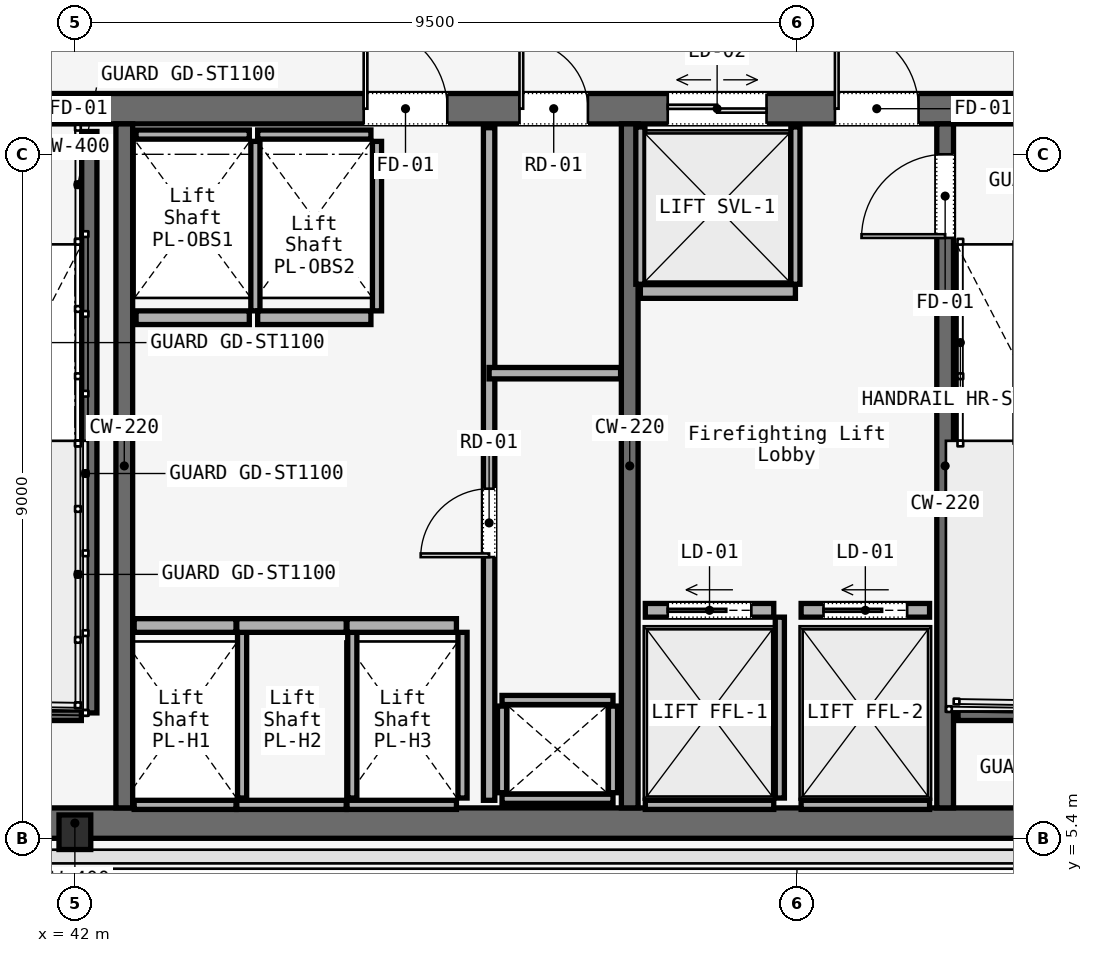
"""IFC4 building model, lengths in metres.
Left out: names, types, materials, properties, quantities, classifications, styles, units other than length and angle.
Written with IfcOpenShell. Run it as: python <this file> out.ifc"""

import sys

from ifc_helpers import new_model, si_unit, direction, frame, frame_2d, origin, origin_2d, place, context, subcontext, project, spatial, rectangle, i_section, extrude, element, fill, save


model = new_model("IFC4")
c1 = context("Model", 3, precision=1e-05, world=origin(), true_north=direction((0.0, 1.0)))
c2 = subcontext(c1, "Body", "Model", "MODEL_VIEW")
j1 = project(units=[si_unit("LENGTHUNIT", "METRE"), si_unit("PLANEANGLEUNIT", "RADIAN")], contexts=[c1])
p1 = place(None, origin())
s1 = spatial("IfcSite", under=j1, at=p1, CompositionType="ELEMENT")
p2 = place(p1, origin())
s2 = spatial("IfcBuilding", under=s1, at=p2, CompositionType="ELEMENT")
p3 = place(p2, frame((0.0, 0.0, 168.8)))
s3 = spatial("IfcBuildingStorey", under=s2, at=p3, CompositionType="ELEMENT", Elevation=168.8)
p4 = place(p3, frame((26.45, 15.0, 0.0), z_axis=(0.0, 0.0, 1.0), x_axis=(1.0, 0.0, 0.0)))
e1 = element("IfcWall", 1, at=p4, inside=s3, PredefinedType="SOLIDWALL", context=c2, shape_type="SweptSolid", body=[
    extrude(rectangle(XDim=31.1, YDim=0.4, at=frame_2d((15.55, 0.0))), origin(), (0.0, 0.0, 1.0), 3.58),
])
p5 = place(p4, frame((1.65, 0.0, 0.0)))
e2 = element("IfcOpeningElement", 2, at=p5, cuts=e1, PredefinedType="OPENING", context=c2, shape_type="SweptSolid", body=[
    extrude(rectangle(XDim=1.1, YDim=2.2, at=frame_2d((0.55, 1.1))), frame((0.0, 0.2, 0.0), z_axis=(0.0, -1.0, 0.0), x_axis=(1.0, 0.0, 0.0)), (0.0, 0.0, 1.0), 0.4),
])
p6 = place(p4, frame((13.65, 0.0, 0.0)))
e3 = element("IfcOpeningElement", 3, at=p6, cuts=e1, PredefinedType="OPENING", context=c2, shape_type="SweptSolid", body=[
    extrude(rectangle(XDim=1.1, YDim=2.2, at=frame_2d((0.55, 1.1))), frame((0.0, 0.2, 0.0), z_axis=(0.0, -1.0, 0.0), x_axis=(1.0, 0.0, 0.0)), (0.0, 0.0, 1.0), 0.4),
])
p7 = place(p4, frame((25.55, 0.0, 0.0)))
e4 = element("IfcOpeningElement", 4, at=p7, cuts=e1, PredefinedType="OPENING", context=c2, shape_type="SweptSolid", body=[
    extrude(rectangle(XDim=1.1, YDim=2.2, at=frame_2d((0.55, 1.1))), frame((0.0, 0.2, 0.0), z_axis=(0.0, -1.0, 0.0), x_axis=(1.0, 0.0, 0.0)), (0.0, 0.0, 1.0), 0.4),
])
p8 = place(p4, frame((10.7, 0.0, 0.0)))
e5 = element("IfcOpeningElement", 5, at=p8, cuts=e1, PredefinedType="OPENING", context=c2, shape_type="SweptSolid", body=[
    extrude(rectangle(XDim=1.4, YDim=2.2, at=frame_2d((0.7, 1.1))), frame((0.0, 0.2, 0.0), z_axis=(0.0, -1.0, 0.0), x_axis=(1.0, 0.0, 0.0)), (0.0, 0.0, 1.0), 0.4),
])
p9 = place(p4, frame((19.35, 0.0, 0.0)))
e6 = element("IfcOpeningElement", 6, at=p9, cuts=e1, PredefinedType="OPENING", context=c2, shape_type="SweptSolid", body=[
    extrude(rectangle(XDim=1.1, YDim=2.2, at=frame_2d((0.55, 1.1))), frame((0.0, 0.2, 0.0), z_axis=(0.0, -1.0, 0.0), x_axis=(1.0, 0.0, 0.0)), (0.0, 0.0, 1.0), 0.4),
])
p10 = place(p4, frame((21.4, 0.0, 0.0)))
e7 = element("IfcOpeningElement", 7, at=p10, cuts=e1, PredefinedType="OPENING", context=c2, shape_type="SweptSolid", body=[
    extrude(rectangle(XDim=0.9, YDim=2.1, at=frame_2d((0.45, 1.05))), frame((0.0, 0.2, 0.0), z_axis=(0.0, -1.0, 0.0), x_axis=(1.0, 0.0, 0.0)), (0.0, 0.0, 1.0), 0.4),
])
p11 = place(p4, frame((23.35, 0.0, 0.0)))
e8 = element("IfcOpeningElement", 8, at=p11, cuts=e1, PredefinedType="OPENING", context=c2, shape_type="SweptSolid", body=[
    extrude(rectangle(XDim=1.3, YDim=2.3, at=frame_2d((0.65, 1.15))), frame((0.0, 0.2, 0.0), z_axis=(0.0, -1.0, 0.0), x_axis=(1.0, 0.0, 0.0)), (0.0, 0.0, 1.0), 0.4),
])
p12 = place(p3, frame((26.45, 5.6, 0.0), z_axis=(0.0, 0.0, 1.0), x_axis=(1.0, 0.0, 0.0)))
e9 = element("IfcWall", 9, at=p12, inside=s3, PredefinedType="SOLIDWALL", context=c2, shape_type="SweptSolid", body=[
    extrude(rectangle(XDim=31.1, YDim=0.4, at=frame_2d((15.55, 0.0))), origin(), (0.0, 0.0, 1.0), 3.58),
])
for number, where, z_axis, x_axis in (
    (10, (42.65, 5.8, 0.0), (0.0, 0.0, 1.0), (0.0, 1.0, 0.0)),
    (11, (49.3, 5.8, 0.0), (0.0, 0.0, 1.0), (0.0, 1.0, 0.0)),
):
    element("IfcWall", number, at=place(p3, frame(where, z_axis=z_axis, x_axis=x_axis)), inside=s3, PredefinedType="SOLIDWALL", context=c2, shape_type="SweptSolid", body=[
        extrude(rectangle(XDim=9.0, YDim=0.22, at=frame_2d((4.5, 0.0))), origin(), (0.0, 0.0, 1.0), 3.58),
    ])
p13 = place(p3, frame((53.45, 5.8, 0.0), z_axis=(0.0, 0.0, 1.0), x_axis=(0.0, 1.0, 0.0)))
e12 = element("IfcWall", 12, at=p13, inside=s3, PredefinedType="SOLIDWALL", context=c2, shape_type="SweptSolid", body=[
    extrude(rectangle(XDim=9.0, YDim=0.22, at=frame_2d((4.5, 0.0))), origin(), (0.0, 0.0, 1.0), 3.58),
])
p14 = place(p13, frame((7.5, 0.0, 0.0)))
e13 = element("IfcOpeningElement", 13, at=p14, cuts=e12, PredefinedType="OPENING", context=c2, shape_type="SweptSolid", body=[
    extrude(rectangle(XDim=1.1, YDim=2.2, at=frame_2d((0.55, 1.1))), frame((0.0, 0.11, 0.0), z_axis=(0.0, -1.0, 0.0), x_axis=(1.0, 0.0, 0.0)), (0.0, 0.0, 1.0), 0.22),
])
p15 = place(p3, frame((42.0, 5.48, 0.0), z_axis=(0.0, 0.0, 1.0), x_axis=(1.0, 0.0, 0.0)))
e14 = element("IfcColumn", 14, at=p15, inside=s3, PredefinedType="COLUMN", context=c2, shape_type="SweptSolid", body=[
    extrude(i_section(OverallWidth=0.418, OverallDepth=0.455, WebThickness=0.042, FlangeThickness=0.052, FilletRadius=0.015, at=origin_2d()), origin(), (0.0, 0.0, 1.0), 3.58),
])
p16 = place(p3, frame((42.19, 14.7, 0.0), z_axis=(0.0, 0.0, 1.0), x_axis=(0.0, -1.0, 0.0)))
e15 = element("IfcWall", 15, at=p16, inside=s3, PredefinedType="SOLIDWALL", context=c2, shape_type="SweptSolid", body=[
    extrude(rectangle(XDim=7.65, YDim=0.2, at=frame_2d((3.825, 0.0))), origin(), (0.0, 0.0, 1.0), 3.8),
])
for number, where, z_axis, x_axis in (
    (16, (38.97, 7.05, 0.0), (0.0, 0.0, 1.0), (1.0, 0.0, 0.0)),
    (17, (53.62, 7.05, 0.0), (0.0, 0.0, 1.0), (1.0, 0.0, 0.0)),
):
    element("IfcWall", number, at=place(p3, frame(where, z_axis=z_axis, x_axis=x_axis)), inside=s3, PredefinedType="SOLIDWALL", context=c2, shape_type="SweptSolid", body=[
        extrude(rectangle(XDim=3.115, YDim=0.2, at=frame_2d((1.558, 0.0))), origin(), (0.0, 0.0, 1.0), 3.8),
    ])
for number, where, z_axis, x_axis in (
    (18, (47.62, 5.92, 0.0), (0.0, 0.0, 1.0), (1.0, 0.0, 0.0)),
    (19, (47.62, 7.22, 0.0), (0.0, 0.0, 1.0), (1.0, 0.0, 0.0)),
):
    element("IfcWall", number, at=place(p3, frame(where, z_axis=z_axis, x_axis=x_axis)), inside=s3, PredefinedType="SOLIDWALL", context=c2, shape_type="SweptSolid", body=[
        extrude(rectangle(XDim=1.46, YDim=0.12, at=frame_2d((0.73, 0.0))), origin(), (0.0, 0.0, 1.0), 3.01),
    ])
for number, where, z_axis, x_axis in (
    (20, (47.62, 6.0, 0.0), (0.0, 0.0, 1.0), (0.0, 1.0, 0.0)),
    (21, (49.08, 6.0, 0.0), (0.0, 0.0, 1.0), (0.0, 1.0, 0.0)),
):
    element("IfcWall", number, at=place(p3, frame(where, z_axis=z_axis, x_axis=x_axis)), inside=s3, PredefinedType="SOLIDWALL", context=c2, shape_type="SweptSolid", body=[
        extrude(rectangle(XDim=1.14, YDim=0.12, at=frame_2d((0.57, 0.0))), origin(), (0.0, 0.0, 1.0), 3.01),
    ])
p17 = place(p3, frame((47.45, 5.9, 0.0), z_axis=(0.0, 0.0, 1.0), x_axis=(0.0, 1.0, 0.0)))
e22 = element("IfcWall", 22, at=p17, inside=s3, PredefinedType="PARTITIONING", context=c2, shape_type="SweptSolid", body=[
    extrude(rectangle(XDim=8.85, YDim=0.15, at=frame_2d((4.425, 0.0))), origin(), (0.0, 0.0, 1.0), 3.01),
])
p18 = place(p17, frame((3.2, 0.0, 0.0)))
e23 = element("IfcOpeningElement", 23, at=p18, cuts=e22, PredefinedType="OPENING", context=c2, shape_type="SweptSolid", body=[
    extrude(rectangle(XDim=0.9, YDim=2.1, at=frame_2d((0.45, 1.05))), frame((0.0, 0.075, 0.0), z_axis=(0.0, -1.0, 0.0), x_axis=(1.0, 0.0, 0.0)), (0.0, 0.0, 1.0), 0.15),
])
p19 = place(p3, frame((47.45, 11.52, 0.0), z_axis=(0.0, 0.0, 1.0), x_axis=(1.0, 0.0, 0.0)))
e24 = element("IfcWall", 24, at=p19, inside=s3, PredefinedType="PARTITIONING", context=c2, shape_type="SweptSolid", body=[
    extrude(rectangle(XDim=1.73, YDim=0.15, at=frame_2d((0.865, 0.0))), origin(), (0.0, 0.0, 1.0), 3.01),
])
p20 = place(p3, frame((42.78, 8.2, 0.0), z_axis=(0.0, 0.0, 1.0), x_axis=(1.0, 0.0, 0.0)))
e25 = element("IfcWall", 25, at=p20, inside=s3, PredefinedType="SOLIDWALL", context=c2, shape_type="SweptSolid", body=[
    extrude(rectangle(XDim=1.34, YDim=0.18, at=frame_2d((0.67, 0.0))), origin(), (0.0, 0.0, 1.0), 3.01),
])
p21 = place(p3, frame((42.78, 5.84, 0.0), z_axis=(0.0, 0.0, 1.0), x_axis=(1.0, 0.0, 0.0)))
e26 = element("IfcWall", 26, at=p21, inside=s3, PredefinedType="SOLIDWALL", context=c2, shape_type="SweptSolid", body=[
    extrude(rectangle(XDim=1.34, YDim=0.12, at=frame_2d((0.67, 0.0))), origin(), (0.0, 0.0, 1.0), 3.01),
])
p22 = place(p3, frame((44.2, 5.93, 0.0), z_axis=(0.0, 0.0, 1.0), x_axis=(0.0, 1.0, 0.0)))
e27 = element("IfcWall", 27, at=p22, inside=s3, PredefinedType="SOLIDWALL", context=c2, shape_type="SweptSolid", body=[
    extrude(rectangle(XDim=2.18, YDim=0.12, at=frame_2d((1.09, 0.0))), origin(), (0.0, 0.0, 1.0), 3.01),
])
p23 = place(p3, frame((44.13, 8.2, 0.0), z_axis=(0.0, 0.0, 1.0), x_axis=(1.0, 0.0, 0.0)))
e28 = element("IfcWall", 28, at=p23, inside=s3, PredefinedType="SOLIDWALL", context=c2, shape_type="SweptSolid", body=[
    extrude(rectangle(XDim=1.44, YDim=0.18, at=frame_2d((0.72, 0.0))), origin(), (0.0, 0.0, 1.0), 3.01),
])
p24 = place(p3, frame((44.13, 5.84, 0.0), z_axis=(0.0, 0.0, 1.0), x_axis=(1.0, 0.0, 0.0)))
e29 = element("IfcWall", 29, at=p24, inside=s3, PredefinedType="SOLIDWALL", context=c2, shape_type="SweptSolid", body=[
    extrude(rectangle(XDim=1.44, YDim=0.12, at=frame_2d((0.72, 0.0))), origin(), (0.0, 0.0, 1.0), 3.01),
])
p25 = place(p3, frame((45.65, 5.93, 0.0), z_axis=(0.0, 0.0, 1.0), x_axis=(0.0, 1.0, 0.0)))
e30 = element("IfcWall", 30, at=p25, inside=s3, PredefinedType="SOLIDWALL", context=c2, shape_type="SweptSolid", body=[
    extrude(rectangle(XDim=2.18, YDim=0.12, at=frame_2d((1.09, 0.0))), origin(), (0.0, 0.0, 1.0), 3.01),
])
p26 = place(p3, frame((45.58, 8.2, 0.0), z_axis=(0.0, 0.0, 1.0), x_axis=(1.0, 0.0, 0.0)))
e31 = element("IfcWall", 31, at=p26, inside=s3, PredefinedType="SOLIDWALL", context=c2, shape_type="SweptSolid", body=[
    extrude(rectangle(XDim=1.44, YDim=0.18, at=frame_2d((0.72, 0.0))), origin(), (0.0, 0.0, 1.0), 3.01),
])
p27 = place(p3, frame((45.58, 5.84, 0.0), z_axis=(0.0, 0.0, 1.0), x_axis=(1.0, 0.0, 0.0)))
e32 = element("IfcWall", 32, at=p27, inside=s3, PredefinedType="SOLIDWALL", context=c2, shape_type="SweptSolid", body=[
    extrude(rectangle(XDim=1.44, YDim=0.12, at=frame_2d((0.72, 0.0))), origin(), (0.0, 0.0, 1.0), 3.01),
])
p28 = place(p3, frame((47.1, 5.93, 0.0), z_axis=(0.0, 0.0, 1.0), x_axis=(0.0, 1.0, 0.0)))
e33 = element("IfcWall", 33, at=p28, inside=s3, PredefinedType="SOLIDWALL", context=c2, shape_type="SweptSolid", body=[
    extrude(rectangle(XDim=2.18, YDim=0.12, at=frame_2d((1.09, 0.0))), origin(), (0.0, 0.0, 1.0), 3.01),
])
p29 = place(p3, frame((42.805, 12.25, 0.0), z_axis=(0.0, 0.0, 1.0), x_axis=(1.0, 0.0, 0.0)))
e34 = element("IfcWall", 34, at=p29, inside=s3, PredefinedType="SOLIDWALL", context=c2, shape_type="SweptSolid", body=[
    extrude(rectangle(XDim=1.49, YDim=0.18, at=frame_2d((0.745, 0.0))), origin(), (0.0, 0.0, 1.0), 3.01),
])
p30 = place(p3, frame((42.805, 14.66, 0.0), z_axis=(0.0, 0.0, 1.0), x_axis=(1.0, 0.0, 0.0)))
e35 = element("IfcWall", 35, at=p30, inside=s3, PredefinedType="SOLIDWALL", context=c2, shape_type="SweptSolid", body=[
    extrude(rectangle(XDim=1.49, YDim=0.12, at=frame_2d((0.745, 0.0))), origin(), (0.0, 0.0, 1.0), 3.01),
])
p31 = place(p3, frame((44.375, 12.34, 0.0), z_axis=(0.0, 0.0, 1.0), x_axis=(0.0, 1.0, 0.0)))
e36 = element("IfcWall", 36, at=p31, inside=s3, PredefinedType="SOLIDWALL", context=c2, shape_type="SweptSolid", body=[
    extrude(rectangle(XDim=2.23, YDim=0.12, at=frame_2d((1.115, 0.0))), origin(), (0.0, 0.0, 1.0), 3.01),
])
p32 = place(p3, frame((44.405, 12.25, 0.0), z_axis=(0.0, 0.0, 1.0), x_axis=(1.0, 0.0, 0.0)))
e37 = element("IfcWall", 37, at=p32, inside=s3, PredefinedType="SOLIDWALL", context=c2, shape_type="SweptSolid", body=[
    extrude(rectangle(XDim=1.49, YDim=0.18, at=frame_2d((0.745, 0.0))), origin(), (0.0, 0.0, 1.0), 3.01),
])
p33 = place(p3, frame((44.405, 14.66, 0.0), z_axis=(0.0, 0.0, 1.0), x_axis=(1.0, 0.0, 0.0)))
e38 = element("IfcWall", 38, at=p33, inside=s3, PredefinedType="SOLIDWALL", context=c2, shape_type="SweptSolid", body=[
    extrude(rectangle(XDim=1.49, YDim=0.12, at=frame_2d((0.745, 0.0))), origin(), (0.0, 0.0, 1.0), 3.01),
])
p34 = place(p3, frame((45.975, 12.34, 0.0), z_axis=(0.0, 0.0, 1.0), x_axis=(0.0, 1.0, 0.0)))
e39 = element("IfcWall", 39, at=p34, inside=s3, PredefinedType="SOLIDWALL", context=c2, shape_type="SweptSolid", body=[
    extrude(rectangle(XDim=2.23, YDim=0.12, at=frame_2d((1.115, 0.0))), origin(), (0.0, 0.0, 1.0), 3.01),
])
p35 = place(p3, frame((49.505, 8.4, 0.0), z_axis=(0.0, 0.0, 1.0), x_axis=(1.0, 0.0, 0.0)))
e40 = element("IfcWall", 40, at=p35, inside=s3, PredefinedType="SOLIDWALL", context=c2, shape_type="SweptSolid", body=[
    extrude(rectangle(XDim=1.69, YDim=0.18, at=frame_2d((0.845, 0.0))), origin(), (0.0, 0.0, 1.0), 3.01),
])
p36 = place(p35, frame((0.295, 0.0, 0.0)))
e41 = element("IfcOpeningElement", 41, at=p36, cuts=e40, PredefinedType="OPENING", context=c2, shape_type="SweptSolid", body=[
    extrude(rectangle(XDim=1.1, YDim=2.2, at=frame_2d((0.55, 1.1))), frame((0.0, 0.09, 0.0), z_axis=(0.0, -1.0, 0.0), x_axis=(1.0, 0.0, 0.0)), (0.0, 0.0, 1.0), 0.18),
])
p37 = place(p3, frame((49.505, 5.84, 0.0), z_axis=(0.0, 0.0, 1.0), x_axis=(1.0, 0.0, 0.0)))
e42 = element("IfcWall", 42, at=p37, inside=s3, PredefinedType="SOLIDWALL", context=c2, shape_type="SweptSolid", body=[
    extrude(rectangle(XDim=1.69, YDim=0.12, at=frame_2d((0.845, 0.0))), origin(), (0.0, 0.0, 1.0), 3.01),
])
p38 = place(p3, frame((51.275, 5.93, 0.0), z_axis=(0.0, 0.0, 1.0), x_axis=(0.0, 1.0, 0.0)))
e43 = element("IfcWall", 43, at=p38, inside=s3, PredefinedType="SOLIDWALL", context=c2, shape_type="SweptSolid", body=[
    extrude(rectangle(XDim=2.38, YDim=0.12, at=frame_2d((1.19, 0.0))), origin(), (0.0, 0.0, 1.0), 3.01),
])
p39 = place(p3, frame((51.555, 8.4, 0.0), z_axis=(0.0, 0.0, 1.0), x_axis=(1.0, 0.0, 0.0)))
e44 = element("IfcWall", 44, at=p39, inside=s3, PredefinedType="SOLIDWALL", context=c2, shape_type="SweptSolid", body=[
    extrude(rectangle(XDim=1.69, YDim=0.18, at=frame_2d((0.845, 0.0))), origin(), (0.0, 0.0, 1.0), 3.01),
])
p40 = place(p39, frame((0.295, 0.0, 0.0)))
e45 = element("IfcOpeningElement", 45, at=p40, cuts=e44, PredefinedType="OPENING", context=c2, shape_type="SweptSolid", body=[
    extrude(rectangle(XDim=1.1, YDim=2.2, at=frame_2d((0.55, 1.1))), frame((0.0, 0.09, 0.0), z_axis=(0.0, -1.0, 0.0), x_axis=(1.0, 0.0, 0.0)), (0.0, 0.0, 1.0), 0.18),
])
p41 = place(p3, frame((51.555, 5.84, 0.0), z_axis=(0.0, 0.0, 1.0), x_axis=(1.0, 0.0, 0.0)))
e46 = element("IfcWall", 46, at=p41, inside=s3, PredefinedType="SOLIDWALL", context=c2, shape_type="SweptSolid", body=[
    extrude(rectangle(XDim=1.69, YDim=0.12, at=frame_2d((0.845, 0.0))), origin(), (0.0, 0.0, 1.0), 3.01),
])
p42 = place(p3, frame((49.44, 12.595, 0.0), z_axis=(0.0, 0.0, 1.0), x_axis=(1.0, 0.0, 0.0)))
e47 = element("IfcWall", 47, at=p42, inside=s3, PredefinedType="SOLIDWALL", context=c2, shape_type="SweptSolid", body=[
    extrude(rectangle(XDim=2.04, YDim=0.18, at=frame_2d((1.02, 0.0))), origin(), (0.0, 0.0, 1.0), 3.01),
])
for number, where, z_axis, x_axis in (
    (48, (49.44, 12.69, 0.0), (0.0, 0.0, 1.0), (0.0, 1.0, 0.0)),
    (49, (51.48, 12.69, 0.0), (0.0, 0.0, 1.0), (0.0, 1.0, 0.0)),
):
    element("IfcWall", number, at=place(p3, frame(where, z_axis=z_axis, x_axis=x_axis)), inside=s3, PredefinedType="SOLIDWALL", context=c2, shape_type="SweptSolid", body=[
        extrude(rectangle(XDim=2.07, YDim=0.12, at=frame_2d((1.035, 0.0))), origin(), (0.0, 0.0, 1.0), 3.01),
    ])
p43 = place(p7, origin())
e50 = element("IfcDoor", 50, at=p43, inside=s3, OperationType="SINGLE_SWING_RIGHT", PredefinedType="DOOR", context=c2, shape_type="SweptSolid", body=[
    extrude(rectangle(XDim=1.1, YDim=2.2, at=frame_2d((0.55, 1.1))), frame((0.0, 0.025, 0.0), z_axis=(0.0, -1.0, 0.0), x_axis=(1.0, 0.0, 0.0)), (0.0, 0.0, 1.0), 0.05),
])
fill(e4, e50)
p44 = place(p9, origin())
e51 = element("IfcDoor", 51, at=p44, inside=s3, OperationType="SINGLE_SWING_LEFT", PredefinedType="DOOR", context=c2, shape_type="SweptSolid", body=[
    extrude(rectangle(XDim=1.1, YDim=2.2, at=frame_2d((0.55, 1.1))), frame((0.0, 0.025, 0.0), z_axis=(0.0, -1.0, 0.0), x_axis=(1.0, 0.0, 0.0)), (0.0, 0.0, 1.0), 0.05),
])
fill(e6, e51)
p45 = place(p10, origin())
e52 = element("IfcDoor", 52, at=p45, inside=s3, OperationType="SINGLE_SWING_LEFT", PredefinedType="DOOR", context=c2, shape_type="SweptSolid", body=[
    extrude(rectangle(XDim=0.9, YDim=2.1, at=frame_2d((0.45, 1.05))), frame((0.0, 0.025, 0.0), z_axis=(0.0, -1.0, 0.0), x_axis=(1.0, 0.0, 0.0)), (0.0, 0.0, 1.0), 0.05),
])
fill(e7, e52)
p46 = place(p14, origin())
e53 = element("IfcDoor", 53, at=p46, inside=s3, OperationType="SINGLE_SWING_LEFT", PredefinedType="DOOR", context=c2, shape_type="SweptSolid", body=[
    extrude(rectangle(XDim=1.1, YDim=2.2, at=frame_2d((0.55, 1.1))), frame((0.0, 0.025, 0.0), z_axis=(0.0, -1.0, 0.0), x_axis=(1.0, 0.0, 0.0)), (0.0, 0.0, 1.0), 0.05),
])
fill(e13, e53)
p47 = place(p18, origin())
e54 = element("IfcDoor", 54, at=p47, inside=s3, OperationType="SINGLE_SWING_LEFT", PredefinedType="DOOR", context=c2, shape_type="SweptSolid", body=[
    extrude(rectangle(XDim=0.9, YDim=2.1, at=frame_2d((0.45, 1.05))), frame((0.0, 0.025, 0.0), z_axis=(0.0, -1.0, 0.0), x_axis=(1.0, 0.0, 0.0)), (0.0, 0.0, 1.0), 0.05),
])
fill(e23, e54)
p48 = place(p36, origin())
e55 = element("IfcDoor", 55, at=p48, inside=s3, OperationType="SLIDING_TO_LEFT", PredefinedType="DOOR", context=c2, shape_type="SweptSolid", body=[
    extrude(rectangle(XDim=1.1, YDim=2.2, at=frame_2d((0.55, 1.1))), frame((0.0, 0.025, 0.0), z_axis=(0.0, -1.0, 0.0), x_axis=(1.0, 0.0, 0.0)), (0.0, 0.0, 1.0), 0.05),
])
fill(e41, e55)
p49 = place(p40, origin())
e56 = element("IfcDoor", 56, at=p49, inside=s3, OperationType="SLIDING_TO_LEFT", PredefinedType="DOOR", context=c2, shape_type="SweptSolid", body=[
    extrude(rectangle(XDim=1.1, YDim=2.2, at=frame_2d((0.55, 1.1))), frame((0.0, 0.025, 0.0), z_axis=(0.0, -1.0, 0.0), x_axis=(1.0, 0.0, 0.0)), (0.0, 0.0, 1.0), 0.05),
])
fill(e45, e56)
p50 = place(p11, origin())
e57 = element("IfcDoor", 57, at=p50, inside=s3, OperationType="DOUBLE_DOOR_SLIDING", PredefinedType="DOOR", context=c2, shape_type="SweptSolid", body=[
    extrude(rectangle(XDim=1.3, YDim=2.3, at=frame_2d((0.65, 1.15))), frame((0.0, 0.025, 0.0), z_axis=(0.0, -1.0, 0.0), x_axis=(1.0, 0.0, 0.0)), (0.0, 0.0, 1.0), 0.05),
])
fill(e8, e57)
save(model, sys.argv[1])
